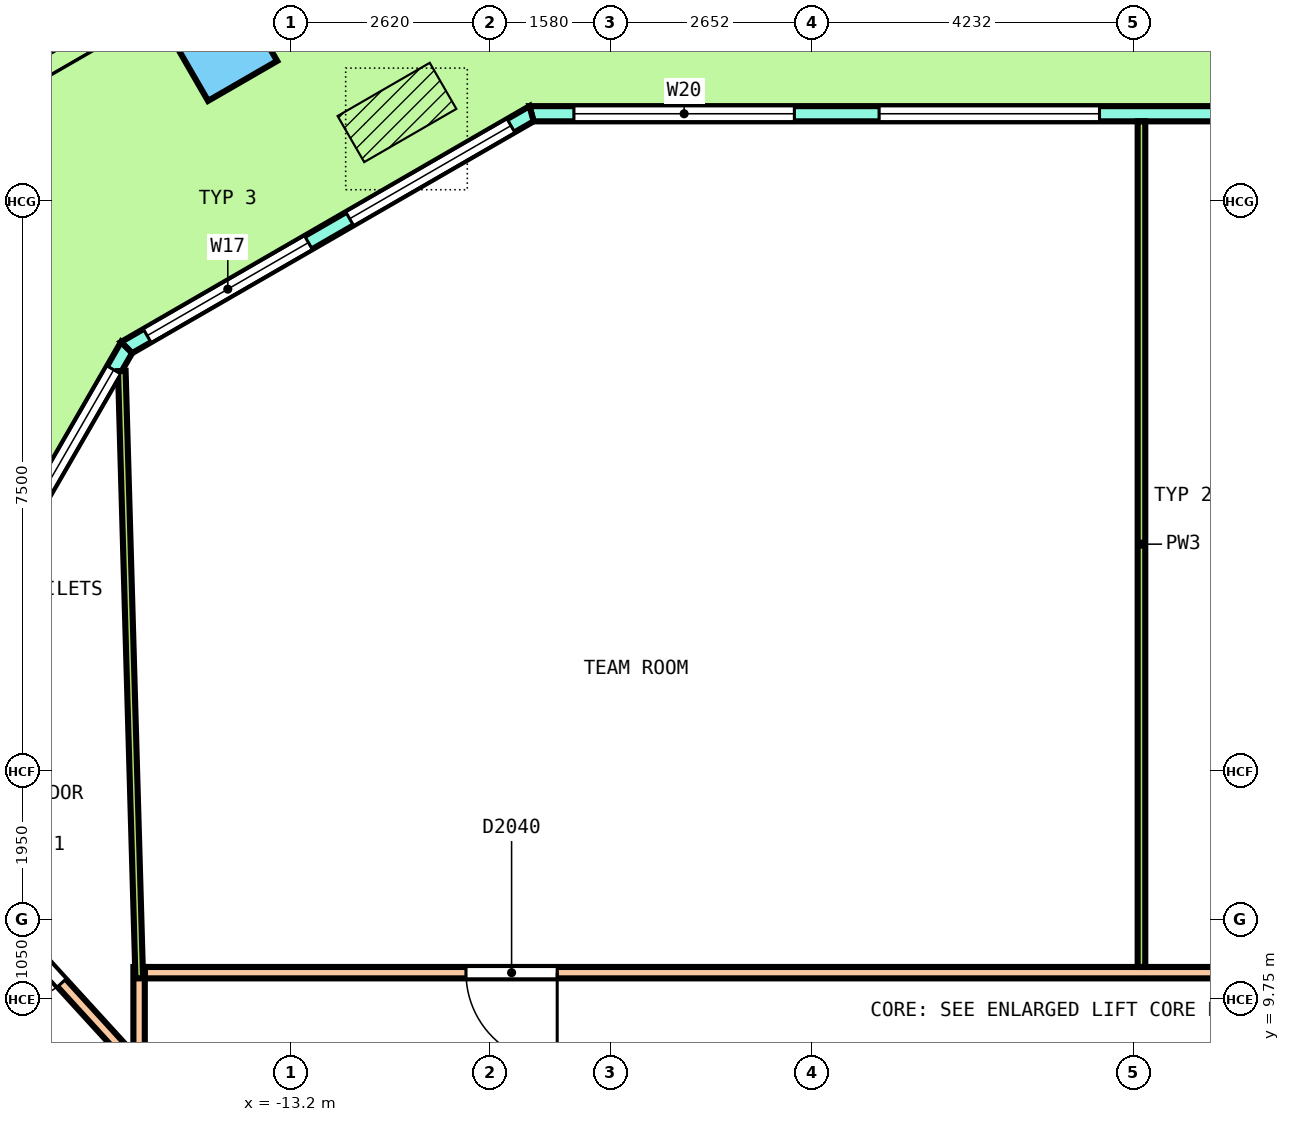
"""IFC4 building model, lengths in metres.
Left out: names, types, materials, properties, quantities, classifications, styles, units other than length and angle.
Written with IfcOpenShell. Run it as: python <this file> out.ifc"""

import sys

from ifc_helpers import new_model, si_unit, direction, frame, frame_2d, origin, origin_2d, place, context, subcontext, project, spatial, polyline, rectangle, outline, extrude, element, fill, save


model = new_model("IFC4")
c1 = context("Model", 3, precision=1e-05, world=origin(), true_north=direction((0.0, 1.0)))
c2 = subcontext(c1, "Body", "Model", "MODEL_VIEW")
j1 = project(units=[si_unit("LENGTHUNIT", "METRE"), si_unit("PLANEANGLEUNIT", "RADIAN")], contexts=[c1])
p1 = place(None, origin())
s1 = spatial("IfcSite", under=j1, at=p1, CompositionType="ELEMENT")
p2 = place(p1, origin())
s2 = spatial("IfcBuilding", under=s1, at=p2, CompositionType="ELEMENT")
p3 = place(p2, frame((0.0, 0.0, 245.4)))
s3 = spatial("IfcBuildingStorey", under=s2, at=p3, CompositionType="ELEMENT", Elevation=245.4)
p4 = place(p3, frame((-14.101, 22.287, 0.0), z_axis=(-0.036227958345, 0.0, 0.999343552055), x_axis=(-0.865314717209, -0.500246354177, -0.031369177763)))
e1 = element("IfcColumn", 1, at=p4, inside=s3, PredefinedType="COLUMN", context=c2, shape_type="SweptSolid", body=[
    extrude(rectangle(XDim=1.05, YDim=1.05, at=origin_2d()), origin(), (0.0, 0.0, 1.0), 3.653),
])
p5 = place(p3, frame((10.037, 21.4, 0.0), z_axis=(0.0, 0.0, 1.0), x_axis=(-1.0, 0.0, 0.0)))
e2 = element("IfcWall", 2, at=p5, inside=s3, PredefinedType="SOLIDWALL", context=c2, shape_type="SweptSolid", body=[
    extrude(outline(polyline([(-0.027, -0.1), (0.979, -0.1), (1.986, -0.1), (2.992, -0.1), (3.999, -0.1), (5.005, -0.1), (6.011, -0.1), (7.018, -0.1), (8.024, -0.1), (9.03, -0.1), (10.037, -0.1), (11.043, -0.1), (12.049, -0.1), (13.056, -0.1), (14.062, -0.1), (15.068, -0.1), (16.075, -0.1), (17.081, -0.1), (18.087, -0.1), (19.094, -0.1), (20.1, -0.1), (20.046, 0.1), (19.045, 0.1), (18.044, 0.1), (17.043, 0.1), (16.042, 0.1), (15.042, 0.1), (14.041, 0.1), (13.04, 0.1), (12.039, 0.1), (11.038, 0.1), (10.037, 0.1), (9.036, 0.1), (8.035, 0.1), (7.034, 0.1), (6.033, 0.1), (5.032, 0.1), (4.031, 0.1), (3.03, 0.1), (2.029, 0.1), (1.028, 0.1), (0.027, 0.1), (-0.027, -0.1)])), origin(), (0.0, 0.0, 1.0), 3.7),
])
p6 = place(p5, frame((0.557, 0.0, 0.1)))
e3 = element("IfcOpeningElement", 3, at=p6, cuts=e2, PredefinedType="OPENING", context=c2, shape_type="SweptSolid", body=[
    extrude(rectangle(XDim=2.9, YDim=2.65, at=frame_2d((1.45, 1.325))), frame((0.0, 0.11, 0.0), z_axis=(0.0, -1.0, 0.0), x_axis=(1.0, 0.0, 0.0)), (0.0, 0.0, 1.0), 0.22),
])
p7 = place(p5, frame((4.572, 0.0, 0.1)))
e4 = element("IfcOpeningElement", 4, at=p7, cuts=e2, PredefinedType="OPENING", context=c2, shape_type="SweptSolid", body=[
    extrude(rectangle(XDim=2.9, YDim=2.65, at=frame_2d((1.45, 1.325))), frame((0.0, 0.11, 0.0), z_axis=(0.0, -1.0, 0.0), x_axis=(1.0, 0.0, 0.0)), (0.0, 0.0, 1.0), 0.22),
])
p8 = place(p5, frame((9.137, 0.0, 0.0)))
e5 = element("IfcOpeningElement", 5, at=p8, cuts=e2, PredefinedType="OPENING", context=c2, shape_type="SweptSolid", body=[
    extrude(rectangle(XDim=1.8, YDim=2.4, at=frame_2d((0.9, 1.2))), frame((0.0, 0.11, 0.0), z_axis=(0.0, -1.0, 0.0), x_axis=(1.0, 0.0, 0.0)), (0.0, 0.0, 1.0), 0.22),
])
p9 = place(p5, frame((9.137, 0.0, 2.55)))
e6 = element("IfcOpeningElement", 6, at=p9, cuts=e2, PredefinedType="OPENING", context=c2, shape_type="SweptSolid", body=[
    extrude(rectangle(XDim=1.8, YDim=0.2, at=frame_2d((0.9, 0.1))), frame((0.0, 0.11, 0.0), z_axis=(0.0, -1.0, 0.0), x_axis=(1.0, 0.0, 0.0)), (0.0, 0.0, 1.0), 0.22),
])
p10 = place(p5, frame((12.601, 0.0, 0.1)))
e7 = element("IfcOpeningElement", 7, at=p10, cuts=e2, PredefinedType="OPENING", context=c2, shape_type="SweptSolid", body=[
    extrude(rectangle(XDim=2.9, YDim=2.65, at=frame_2d((1.45, 1.325))), frame((0.0, 0.11, 0.0), z_axis=(0.0, -1.0, 0.0), x_axis=(1.0, 0.0, 0.0)), (0.0, 0.0, 1.0), 0.22),
])
p11 = place(p5, frame((16.616, 0.0, 0.1)))
e8 = element("IfcOpeningElement", 8, at=p11, cuts=e2, PredefinedType="OPENING", context=c2, shape_type="SweptSolid", body=[
    extrude(rectangle(XDim=2.9, YDim=2.65, at=frame_2d((1.45, 1.325))), frame((0.0, 0.11, 0.0), z_axis=(0.0, -1.0, 0.0), x_axis=(1.0, 0.0, 0.0)), (0.0, 0.0, 1.0), 0.22),
])
p12 = place(p3, frame((-10.037, 21.4, 0.0), z_axis=(0.0, 0.0, 1.0), x_axis=(-0.866029647142, -0.499992650217, 0.0)))
e9 = element("IfcWall", 9, at=p12, inside=s3, PredefinedType="SOLIDWALL", context=c2, shape_type="SweptSolid", body=[
    extrude(outline(polyline([(-0.027, -0.1), (1.008, -0.1), (2.042, -0.1), (3.076, -0.1), (4.111, -0.1), (5.145, -0.1), (6.18, -0.1), (6.126, 0.1), (5.109, 0.1), (4.093, 0.1), (3.076, 0.1), (2.06, 0.1), (1.043, 0.1), (0.027, 0.1), (-0.027, -0.1)])), origin(), (0.0, 0.0, 1.0), 3.7),
])
p13 = place(p12, frame((0.313, 0.0, 0.1)))
e10 = element("IfcOpeningElement", 10, at=p13, cuts=e9, PredefinedType="OPENING", context=c2, shape_type="SweptSolid", body=[
    extrude(rectangle(XDim=2.45, YDim=2.65, at=frame_2d((1.225, 1.325))), frame((0.0, 0.11, 0.0), z_axis=(0.0, -1.0, 0.0), x_axis=(1.0, 0.0, 0.0)), (0.0, 0.0, 1.0), 0.22),
])
p14 = place(p12, frame((3.39, 0.0, 0.1)))
e11 = element("IfcOpeningElement", 11, at=p14, cuts=e9, PredefinedType="OPENING", context=c2, shape_type="SweptSolid", body=[
    extrude(rectangle(XDim=2.45, YDim=2.65, at=frame_2d((1.225, 1.325))), frame((0.0, 0.11, 0.0), z_axis=(0.0, -1.0, 0.0), x_axis=(1.0, 0.0, 0.0)), (0.0, 0.0, 1.0), 0.22),
])
p15 = place(p3, frame((-15.365, 18.323, 0.0), z_axis=(0.0, 0.0, 1.0), x_axis=(-0.500004284815, -0.866022929931, 0.0)))
e12 = element("IfcWall", 12, at=p15, inside=s3, PredefinedType="SOLIDWALL", context=c2, shape_type="SweptSolid", body=[
    extrude(outline(polyline([(-0.027, -0.1), (1.0, -0.1), (2.026, -0.1), (3.053, -0.1), (4.08, -0.1), (5.106, -0.1), (6.133, -0.1), (7.159, -0.1), (8.186, -0.1), (9.212, -0.1), (10.239, -0.1), (11.266, -0.1), (12.292, -0.1), (13.319, -0.1), (14.345, -0.1), (15.372, -0.1), (16.399, -0.1), (16.345, 0.1), (15.325, 0.1), (14.305, 0.1), (13.285, 0.1), (12.265, 0.1), (11.246, 0.1), (10.226, 0.1), (9.206, 0.1), (8.186, 0.1), (7.166, 0.1), (6.146, 0.1), (5.126, 0.1), (4.106, 0.1), (3.086, 0.1), (2.067, 0.1), (1.047, 0.1), (0.027, 0.1), (-0.027, -0.1)])), origin(), (0.0, 0.0, 1.0), 3.7),
])
p16 = place(p15, frame((0.337, 0.0, 0.1)))
e13 = element("IfcOpeningElement", 13, at=p16, cuts=e12, PredefinedType="OPENING", context=c2, shape_type="SweptSolid", body=[
    extrude(rectangle(XDim=2.6, YDim=2.65, at=frame_2d((1.3, 1.325))), frame((0.0, 0.11, 0.0), z_axis=(0.0, -1.0, 0.0), x_axis=(1.0, 0.0, 0.0)), (0.0, 0.0, 1.0), 0.22),
])
p17 = place(p15, frame((3.612, 0.0, 0.1)))
e14 = element("IfcOpeningElement", 14, at=p17, cuts=e12, PredefinedType="OPENING", context=c2, shape_type="SweptSolid", body=[
    extrude(rectangle(XDim=2.6, YDim=2.65, at=frame_2d((1.3, 1.325))), frame((0.0, 0.11, 0.0), z_axis=(0.0, -1.0, 0.0), x_axis=(1.0, 0.0, 0.0)), (0.0, 0.0, 1.0), 0.22),
])
p18 = place(p15, frame((7.286, 0.0, 0.0)))
e15 = element("IfcOpeningElement", 15, at=p18, cuts=e12, PredefinedType="OPENING", context=c2, shape_type="SweptSolid", body=[
    extrude(rectangle(XDim=1.8, YDim=2.4, at=frame_2d((0.9, 1.2))), frame((0.0, 0.11, 0.0), z_axis=(0.0, -1.0, 0.0), x_axis=(1.0, 0.0, 0.0)), (0.0, 0.0, 1.0), 0.22),
])
p19 = place(p15, frame((7.286, 0.0, 2.55)))
e16 = element("IfcOpeningElement", 16, at=p19, cuts=e12, PredefinedType="OPENING", context=c2, shape_type="SweptSolid", body=[
    extrude(rectangle(XDim=1.8, YDim=0.2, at=frame_2d((0.9, 0.1))), frame((0.0, 0.11, 0.0), z_axis=(0.0, -1.0, 0.0), x_axis=(1.0, 0.0, 0.0)), (0.0, 0.0, 1.0), 0.22),
])
p20 = place(p15, frame((10.16, 0.0, 0.1)))
e17 = element("IfcOpeningElement", 17, at=p20, cuts=e12, PredefinedType="OPENING", context=c2, shape_type="SweptSolid", body=[
    extrude(rectangle(XDim=2.6, YDim=2.65, at=frame_2d((1.3, 1.325))), frame((0.0, 0.11, 0.0), z_axis=(0.0, -1.0, 0.0), x_axis=(1.0, 0.0, 0.0)), (0.0, 0.0, 1.0), 0.22),
])
p21 = place(p15, frame((13.435, 0.0, 0.1)))
e18 = element("IfcOpeningElement", 18, at=p21, cuts=e12, PredefinedType="OPENING", context=c2, shape_type="SweptSolid", body=[
    extrude(rectangle(XDim=2.6, YDim=2.65, at=frame_2d((1.3, 1.325))), frame((0.0, 0.11, 0.0), z_axis=(0.0, -1.0, 0.0), x_axis=(1.0, 0.0, 0.0)), (0.0, 0.0, 1.0), 0.22),
])
p22 = place(p3, frame((-18.582, 12.552, 0.0), z_axis=(0.0, 0.0, 1.0), x_axis=(0.674506078273, -0.738269293939, 0.0)))
e19 = element("IfcWall", 19, at=p22, inside=s3, PredefinedType="PARTITIONING", context=c2, shape_type="SweptSolid", body=[
    extrude(rectangle(XDim=4.939, YDim=0.15, at=frame_2d((2.47, 0.0))), origin(), (0.0, 0.0, 1.0), 2.8),
])
p23 = place(p22, frame((2.504, 0.0, 0.0)))
e20 = element("IfcOpeningElement", 20, at=p23, cuts=e19, PredefinedType="OPENING", context=c2, shape_type="SweptSolid", body=[
    extrude(rectangle(XDim=1.0, YDim=2.1, at=frame_2d((0.5, 1.05))), frame((0.0, 0.085, 0.0), z_axis=(0.0, -1.0, 0.0), x_axis=(1.0, 0.0, 0.0)), (0.0, 0.0, 1.0), 0.17),
])
p24 = place(p3, frame((-20.189, 9.769, 0.0), z_axis=(0.0, 0.0, 1.0), x_axis=(0.885426366371, -0.464779678702, 0.0)))
e21 = element("IfcWall", 21, at=p24, inside=s3, PredefinedType="PARTITIONING", context=c2, shape_type="SweptSolid", body=[
    extrude(rectangle(XDim=5.56, YDim=0.15, at=frame_2d((2.78, 0.0))), origin(), (0.0, 0.0, 1.0), 2.8),
])
p25 = place(p3, frame((-15.125, 10.1, 0.0), z_axis=(0.0, 0.0, 1.0), x_axis=(1.0, 0.0, 0.0)))
e22 = element("IfcWall", 22, at=p25, inside=s3, PredefinedType="PARTITIONING", context=c2, shape_type="SweptSolid", body=[
    extrude(rectangle(XDim=30.275, YDim=0.15, at=frame_2d((15.137, 0.0))), origin(), (0.0, 0.0, 1.0), 2.8),
])
p26 = place(p25, frame((28.116, 0.0, 0.0)))
e23 = element("IfcOpeningElement", 23, at=p26, cuts=e22, PredefinedType="OPENING", context=c2, shape_type="SweptSolid", body=[
    extrude(rectangle(XDim=1.0, YDim=2.1, at=frame_2d((0.5, 1.05))), frame((0.0, 0.085, 0.0), z_axis=(0.0, -1.0, 0.0), x_axis=(1.0, 0.0, 0.0)), (0.0, 0.0, 1.0), 0.17),
])
p27 = place(p25, frame((21.244, 0.0, 0.0)))
e24 = element("IfcOpeningElement", 24, at=p27, cuts=e22, PredefinedType="OPENING", context=c2, shape_type="SweptSolid", body=[
    extrude(rectangle(XDim=1.0, YDim=2.1, at=frame_2d((0.5, 1.05))), frame((0.0, 0.085, 0.0), z_axis=(0.0, -1.0, 0.0), x_axis=(1.0, 0.0, 0.0)), (0.0, 0.0, 1.0), 0.17),
])
p28 = place(p25, frame((4.226, 0.0, 0.0)))
e25 = element("IfcOpeningElement", 25, at=p28, cuts=e22, PredefinedType="OPENING", context=c2, shape_type="SweptSolid", body=[
    extrude(rectangle(XDim=1.2, YDim=2.1, at=frame_2d((0.6, 1.05))), frame((0.0, 0.085, 0.0), z_axis=(0.0, -1.0, 0.0), x_axis=(1.0, 0.0, 0.0)), (0.0, 0.0, 1.0), 0.17),
])
p29 = place(p3, frame((-15.2, 8.775, 0.0), z_axis=(0.0, 0.0, 1.0), x_axis=(0.0, 1.0, 0.0)))
e26 = element("IfcWall", 26, at=p29, inside=s3, PredefinedType="PARTITIONING", context=c2, shape_type="SweptSolid", body=[
    extrude(rectangle(XDim=1.4, YDim=0.15, at=frame_2d((0.7, 0.0))), origin(), (0.0, 0.0, 1.0), 2.8),
])
p30 = place(p3, frame((-2.013, 10.175, 0.0), z_axis=(0.0, 0.0, 1.0), x_axis=(0.0, 1.0, 0.0)))
e27 = element("IfcWall", 27, at=p30, inside=s3, PredefinedType="PARTITIONING", context=c2, shape_type="SweptSolid", body=[
    extrude(rectangle(XDim=11.125, YDim=0.1, at=frame_2d((5.562, 0.0))), origin(), (0.0, 0.0, 1.0), 2.8),
])
p31 = place(p3, frame((-15.427, 18.016, 0.0), z_axis=(0.0, 0.0, 1.0), x_axis=(0.028738506964, -0.999586963809, 0.0)))
e28 = element("IfcWall", 28, at=p31, inside=s3, PredefinedType="PARTITIONING", context=c2, shape_type="SweptSolid", body=[
    extrude(rectangle(XDim=7.994, YDim=0.1, at=frame_2d((3.997, 0.0))), origin(), (0.0, 0.0, 1.0), 2.8),
])
p32 = place(p10, origin())
e29 = element("IfcWindow", 29, at=p32, inside=s3, PartitioningType="SINGLE_PANEL", PredefinedType="WINDOW", context=c2, shape_type="SweptSolid", body=[
    extrude(rectangle(XDim=2.9, YDim=2.65, at=frame_2d((1.45, 1.325))), frame((0.0, 0.03, 0.0), z_axis=(0.0, -1.0, 0.0), x_axis=(1.0, 0.0, 0.0)), (0.0, 0.0, 1.0), 0.06),
])
fill(e7, e29)
p33 = place(p11, origin())
e30 = element("IfcWindow", 30, at=p33, inside=s3, PartitioningType="SINGLE_PANEL", PredefinedType="WINDOW", context=c2, shape_type="SweptSolid", body=[
    extrude(rectangle(XDim=2.9, YDim=2.65, at=frame_2d((1.45, 1.325))), frame((0.0, 0.03, 0.0), z_axis=(0.0, -1.0, 0.0), x_axis=(1.0, 0.0, 0.0)), (0.0, 0.0, 1.0), 0.06),
])
fill(e8, e30)
p34 = place(p13, origin())
e31 = element("IfcWindow", 31, at=p34, inside=s3, PartitioningType="SINGLE_PANEL", PredefinedType="WINDOW", context=c2, shape_type="SweptSolid", body=[
    extrude(rectangle(XDim=2.45, YDim=2.65, at=frame_2d((1.225, 1.325))), frame((0.0, 0.03, 0.0), z_axis=(0.0, -1.0, 0.0), x_axis=(1.0, 0.0, 0.0)), (0.0, 0.0, 1.0), 0.06),
])
fill(e10, e31)
p35 = place(p14, origin())
e32 = element("IfcWindow", 32, at=p35, inside=s3, PartitioningType="SINGLE_PANEL", PredefinedType="WINDOW", context=c2, shape_type="SweptSolid", body=[
    extrude(rectangle(XDim=2.45, YDim=2.65, at=frame_2d((1.225, 1.325))), frame((0.0, 0.03, 0.0), z_axis=(0.0, -1.0, 0.0), x_axis=(1.0, 0.0, 0.0)), (0.0, 0.0, 1.0), 0.06),
])
fill(e11, e32)
p36 = place(p16, origin())
e33 = element("IfcWindow", 33, at=p36, inside=s3, PartitioningType="SINGLE_PANEL", PredefinedType="WINDOW", context=c2, shape_type="SweptSolid", body=[
    extrude(rectangle(XDim=2.6, YDim=2.65, at=frame_2d((1.3, 1.325))), frame((0.0, 0.03, 0.0), z_axis=(0.0, -1.0, 0.0), x_axis=(1.0, 0.0, 0.0)), (0.0, 0.0, 1.0), 0.06),
])
fill(e13, e33)
p37 = place(p28, origin())
e34 = element("IfcDoor", 34, at=p37, inside=s3, OperationType="DOUBLE_DOOR_SINGLE_SWING", PredefinedType="DOOR", context=c2, shape_type="SweptSolid", body=[
    extrude(rectangle(XDim=1.2, YDim=2.1, at=frame_2d((0.6, 1.05))), frame((0.0, 0.025, 0.0), z_axis=(0.0, -1.0, 0.0), x_axis=(1.0, 0.0, 0.0)), (0.0, 0.0, 1.0), 0.05),
])
fill(e25, e34)
p38 = place(p23, origin())
e35 = element("IfcDoor", 35, at=p38, inside=s3, OperationType="SINGLE_SWING_RIGHT", PredefinedType="DOOR", context=c2, shape_type="SweptSolid", body=[
    extrude(rectangle(XDim=1.0, YDim=2.1, at=frame_2d((0.5, 1.05))), frame((0.0, 0.025, 0.0), z_axis=(0.0, -1.0, 0.0), x_axis=(1.0, 0.0, 0.0)), (0.0, 0.0, 1.0), 0.05),
])
fill(e20, e35)
save(model, sys.argv[1])
